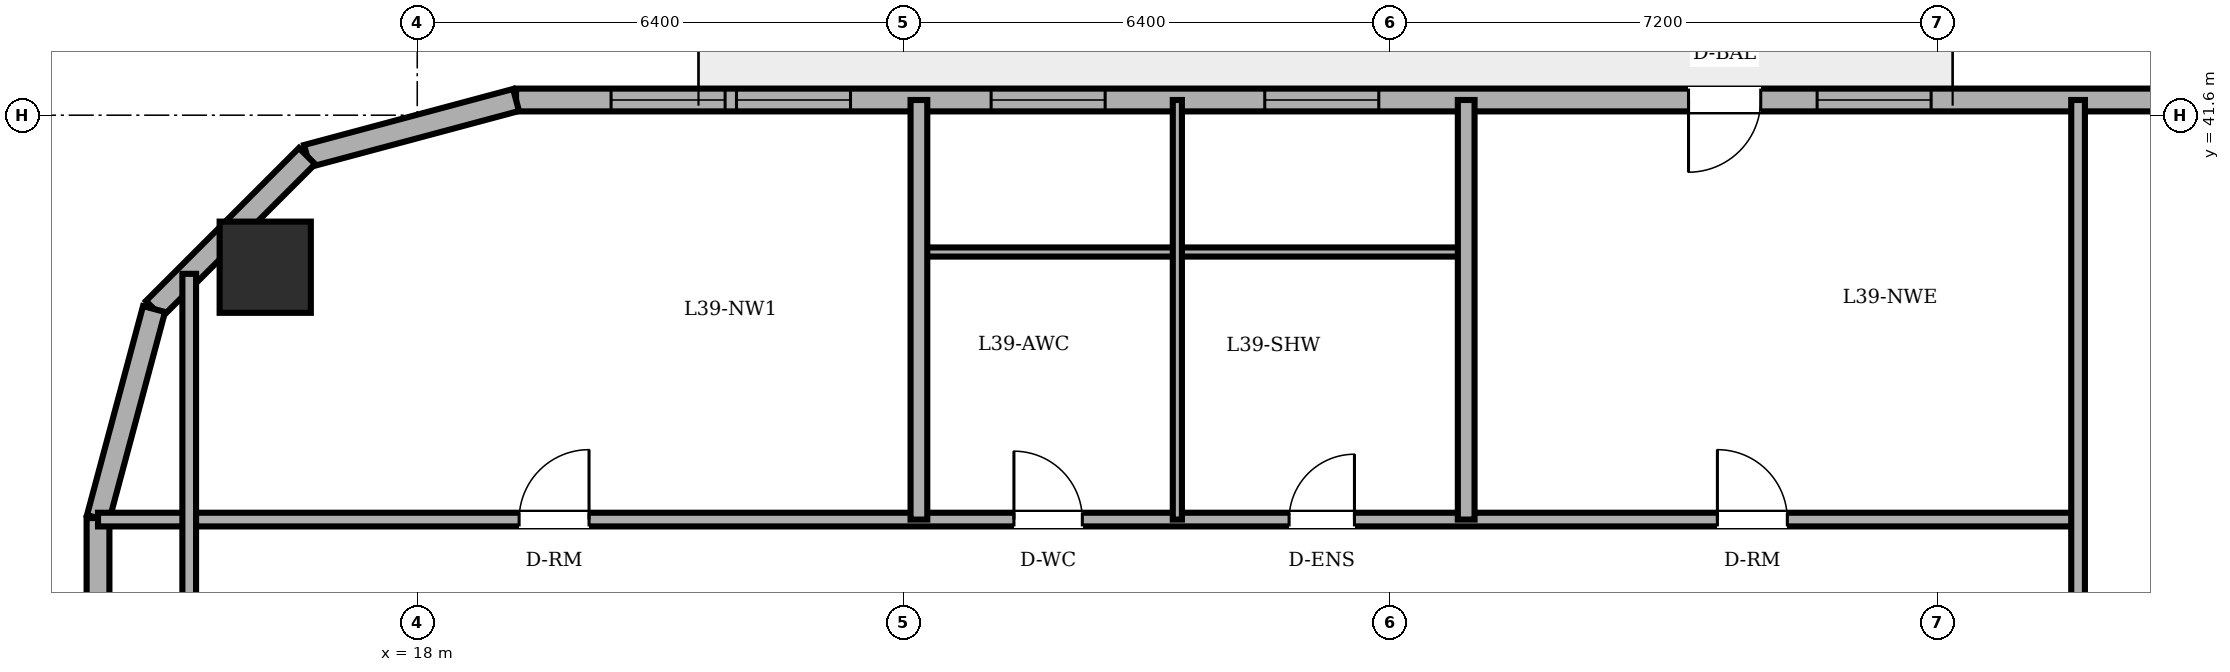
"""IFC4 building model, lengths in metres.
Left out: names, types, materials, properties, quantities, classifications, styles, units other than length and angle.
Written with IfcOpenShell. Run it as: python <this file> out.ifc"""

import sys

from ifc_helpers import new_model, si_unit, direction, frame, frame_2d, origin, origin_2d, place, context, subcontext, project, spatial, rectangle, circle, extrude, element, fill, save


model = new_model("IFC4")
c1 = context("Model", 3, precision=1e-05, world=origin(), true_north=direction((0.0, 1.0)))
c2 = subcontext(c1, "Body", "Model", "MODEL_VIEW")
j1 = project(units=[si_unit("LENGTHUNIT", "METRE"), si_unit("PLANEANGLEUNIT", "RADIAN")], contexts=[c1])
p1 = place(None, origin())
s1 = spatial("IfcSite", under=j1, at=p1, CompositionType="ELEMENT")
p2 = place(p1, origin())
s2 = spatial("IfcBuilding", under=s1, at=p2, CompositionType="ELEMENT")
p3 = place(p2, frame((0.0, 0.0, 151.0)))
s3 = spatial("IfcBuildingStorey", under=s2, at=p3, CompositionType="ELEMENT", Elevation=151.0)
p4 = place(p3, frame((16.0, 39.6, 0.0), z_axis=(0.0, 0.0, 1.0), x_axis=(1.0, 0.0, 0.0)))
e1 = element("IfcColumn", 1, at=p4, inside=s3, PredefinedType="COLUMN", context=c2, shape_type="SweptSolid", body=[
    extrude(circle(Radius=0.6, at=origin_2d()), origin(), (0.0, 0.0, 1.0), 3.6),
])
p5 = place(p3, frame((49.582, 41.8, 0.0), z_axis=(0.0, 0.0, 1.0), x_axis=(-1.0, 0.0, 0.0)))
e2 = element("IfcWall", 2, at=p5, inside=s3, PredefinedType="SOLIDWALL", context=c2, shape_type="SweptSolid", body=[
    extrude(rectangle(XDim=30.282, YDim=0.3, at=frame_2d((15.141, 0.0))), origin(), (0.0, 0.0, 1.0), 3.4),
])
p6 = place(p5, frame((13.907, 0.0, 0.0)))
e3 = element("IfcOpeningElement", 3, at=p6, cuts=e2, PredefinedType="OPENING", context=c2, shape_type="SweptSolid", body=[
    extrude(rectangle(XDim=0.95, YDim=2.2, at=frame_2d((0.475, 1.1))), frame((0.0, 0.16, 0.0), z_axis=(0.0, -1.0, 0.0), x_axis=(1.0, 0.0, 0.0)), (0.0, 0.0, 1.0), 0.32),
])
p7 = place(p5, frame((1.661, 0.0, 0.85)))
e4 = element("IfcOpeningElement", 4, at=p7, cuts=e2, PredefinedType="OPENING", context=c2, shape_type="SweptSolid", body=[
    extrude(rectangle(XDim=1.5, YDim=1.55, at=frame_2d((0.75, 0.775))), frame((0.0, 0.16, 0.0), z_axis=(0.0, -1.0, 0.0), x_axis=(1.0, 0.0, 0.0)), (0.0, 0.0, 1.0), 0.32),
])
p8 = place(p5, frame((5.476, 0.0, 0.85)))
e5 = element("IfcOpeningElement", 5, at=p8, cuts=e2, PredefinedType="OPENING", context=c2, shape_type="SweptSolid", body=[
    extrude(rectangle(XDim=1.5, YDim=1.55, at=frame_2d((0.75, 0.775))), frame((0.0, 0.16, 0.0), z_axis=(0.0, -1.0, 0.0), x_axis=(1.0, 0.0, 0.0)), (0.0, 0.0, 1.0), 0.32),
])
p9 = place(p5, frame((7.229, 0.0, 0.85)))
e6 = element("IfcOpeningElement", 6, at=p9, cuts=e2, PredefinedType="OPENING", context=c2, shape_type="SweptSolid", body=[
    extrude(rectangle(XDim=1.5, YDim=1.55, at=frame_2d((0.75, 0.775))), frame((0.0, 0.16, 0.0), z_axis=(0.0, -1.0, 0.0), x_axis=(1.0, 0.0, 0.0)), (0.0, 0.0, 1.0), 0.32),
])
p10 = place(p5, frame((11.665, 0.0, 0.85)))
e7 = element("IfcOpeningElement", 7, at=p10, cuts=e2, PredefinedType="OPENING", context=c2, shape_type="SweptSolid", body=[
    extrude(rectangle(XDim=1.5, YDim=1.55, at=frame_2d((0.75, 0.775))), frame((0.0, 0.16, 0.0), z_axis=(0.0, -1.0, 0.0), x_axis=(1.0, 0.0, 0.0)), (0.0, 0.0, 1.0), 0.32),
])
p11 = place(p5, frame((18.932, 0.0, 0.85)))
e8 = element("IfcOpeningElement", 8, at=p11, cuts=e2, PredefinedType="OPENING", context=c2, shape_type="SweptSolid", body=[
    extrude(rectangle(XDim=1.5, YDim=1.55, at=frame_2d((0.75, 0.775))), frame((0.0, 0.16, 0.0), z_axis=(0.0, -1.0, 0.0), x_axis=(1.0, 0.0, 0.0)), (0.0, 0.0, 1.0), 0.32),
])
p12 = place(p5, frame((22.532, 0.0, 0.85)))
e9 = element("IfcOpeningElement", 9, at=p12, cuts=e2, PredefinedType="OPENING", context=c2, shape_type="SweptSolid", body=[
    extrude(rectangle(XDim=1.5, YDim=1.55, at=frame_2d((0.75, 0.775))), frame((0.0, 0.16, 0.0), z_axis=(0.0, -1.0, 0.0), x_axis=(1.0, 0.0, 0.0)), (0.0, 0.0, 1.0), 0.32),
])
p13 = place(p5, frame((25.882, 0.0, 0.85)))
e10 = element("IfcOpeningElement", 10, at=p13, cuts=e2, PredefinedType="OPENING", context=c2, shape_type="SweptSolid", body=[
    extrude(rectangle(XDim=1.5, YDim=1.55, at=frame_2d((0.75, 0.775))), frame((0.0, 0.16, 0.0), z_axis=(0.0, -1.0, 0.0), x_axis=(1.0, 0.0, 0.0)), (0.0, 0.0, 1.0), 0.32),
])
p14 = place(p5, frame((27.532, 0.0, 0.85)))
e11 = element("IfcOpeningElement", 11, at=p14, cuts=e2, PredefinedType="OPENING", context=c2, shape_type="SweptSolid", body=[
    extrude(rectangle(XDim=1.5, YDim=1.55, at=frame_2d((0.75, 0.775))), frame((0.0, 0.16, 0.0), z_axis=(0.0, -1.0, 0.0), x_axis=(1.0, 0.0, 0.0)), (0.0, 0.0, 1.0), 0.32),
])
p15 = place(p3, frame((19.3, 41.8, 0.0), z_axis=(0.0, 0.0, 1.0), x_axis=(-0.965908238586, -0.258884674387, 0.0)))
e12 = element("IfcWall", 12, at=p15, inside=s3, PredefinedType="SOLIDWALL", context=c2, shape_type="SweptSolid", body=[
    extrude(rectangle(XDim=2.847, YDim=0.3, at=frame_2d((1.424, 0.0))), origin(), (0.0, 0.0, 1.0), 3.4),
])
p16 = place(p3, frame((16.55, 41.063, 0.0), z_axis=(0.0, 0.0, 1.0), x_axis=(-0.707106781187, -0.707106781187, 0.0)))
e13 = element("IfcWall", 13, at=p16, inside=s3, PredefinedType="SOLIDWALL", context=c2, shape_type="SweptSolid", body=[
    extrude(rectangle(XDim=2.847, YDim=0.3, at=frame_2d((1.423, 0.0))), origin(), (0.0, 0.0, 1.0), 3.4),
])
p17 = place(p3, frame((14.537, 39.05, 0.0), z_axis=(0.0, 0.0, 1.0), x_axis=(-0.258884674387, -0.965908238586, 0.0)))
e14 = element("IfcWall", 14, at=p17, inside=s3, PredefinedType="SOLIDWALL", context=c2, shape_type="SweptSolid", body=[
    extrude(rectangle(XDim=2.847, YDim=0.3, at=frame_2d((1.424, 0.0))), origin(), (0.0, 0.0, 1.0), 3.4),
])
p18 = place(p3, frame((13.8, 36.3, 0.0), z_axis=(0.0, 0.0, 1.0), x_axis=(0.0, -1.0, 0.0)))
e15 = element("IfcWall", 15, at=p18, inside=s3, PredefinedType="SOLIDWALL", context=c2, shape_type="SweptSolid", body=[
    extrude(rectangle(XDim=24.6, YDim=0.3, at=frame_2d((12.3, 0.0))), origin(), (0.0, 0.0, 1.0), 3.4),
])
p19 = place(p18, frame((5.003, 0.0, 0.85)))
e16 = element("IfcOpeningElement", 16, at=p19, cuts=e15, PredefinedType="OPENING", context=c2, shape_type="SweptSolid", body=[
    extrude(rectangle(XDim=1.5, YDim=1.55, at=frame_2d((0.75, 0.775))), frame((0.0, 0.16, 0.0), z_axis=(0.0, -1.0, 0.0), x_axis=(1.0, 0.0, 0.0)), (0.0, 0.0, 1.0), 0.32),
])
p20 = place(p18, frame((8.277, 0.0, 0.85)))
e17 = element("IfcOpeningElement", 17, at=p20, cuts=e15, PredefinedType="OPENING", context=c2, shape_type="SweptSolid", body=[
    extrude(rectangle(XDim=1.5, YDim=1.55, at=frame_2d((0.75, 0.775))), frame((0.0, 0.16, 0.0), z_axis=(0.0, -1.0, 0.0), x_axis=(1.0, 0.0, 0.0)), (0.0, 0.0, 1.0), 0.32),
])
p21 = place(p18, frame((14.823, 0.0, 0.85)))
e18 = element("IfcOpeningElement", 18, at=p21, cuts=e15, PredefinedType="OPENING", context=c2, shape_type="SweptSolid", body=[
    extrude(rectangle(XDim=1.5, YDim=1.55, at=frame_2d((0.75, 0.775))), frame((0.0, 0.16, 0.0), z_axis=(0.0, -1.0, 0.0), x_axis=(1.0, 0.0, 0.0)), (0.0, 0.0, 1.0), 0.32),
])
p22 = place(p18, frame((18.097, 0.0, 0.85)))
e19 = element("IfcOpeningElement", 19, at=p22, cuts=e15, PredefinedType="OPENING", context=c2, shape_type="SweptSolid", body=[
    extrude(rectangle(XDim=1.5, YDim=1.55, at=frame_2d((0.75, 0.775))), frame((0.0, 0.16, 0.0), z_axis=(0.0, -1.0, 0.0), x_axis=(1.0, 0.0, 0.0)), (0.0, 0.0, 1.0), 0.32),
])
p23 = place(p3, frame((13.8, 36.28, 0.0), z_axis=(0.0, 0.0, 1.0), x_axis=(1.0, 0.0, 0.0)))
e20 = element("IfcWall", 20, at=p23, inside=s3, PredefinedType="PARTITIONING", context=c2, shape_type="SweptSolid", body=[
    extrude(rectangle(XDim=26.05, YDim=0.18, at=frame_2d((13.025, 0.0))), origin(), (0.0, 0.0, 1.0), 3.4),
])
p24 = place(p23, frame((12.05, 0.0, 0.0)))
e21 = element("IfcOpeningElement", 21, at=p24, cuts=e20, PredefinedType="OPENING", context=c2, shape_type="SweptSolid", body=[
    extrude(rectangle(XDim=0.9, YDim=2.1, at=frame_2d((0.45, 1.05))), frame((0.0, 0.1, 0.0), z_axis=(0.0, -1.0, 0.0), x_axis=(1.0, 0.0, 0.0)), (0.0, 0.0, 1.0), 0.2),
])
p25 = place(p23, frame((15.67, 0.0, 0.0)))
e22 = element("IfcOpeningElement", 22, at=p25, cuts=e20, PredefinedType="OPENING", context=c2, shape_type="SweptSolid", body=[
    extrude(rectangle(XDim=0.86, YDim=2.1, at=frame_2d((0.43, 1.05))), frame((0.0, 0.1, 0.0), z_axis=(0.0, -1.0, 0.0), x_axis=(1.0, 0.0, 0.0)), (0.0, 0.0, 1.0), 0.2),
])
p26 = place(p23, frame((5.54, 0.0, 0.0)))
e23 = element("IfcOpeningElement", 23, at=p26, cuts=e20, PredefinedType="OPENING", context=c2, shape_type="SweptSolid", body=[
    extrude(rectangle(XDim=0.92, YDim=2.1, at=frame_2d((0.46, 1.05))), frame((0.0, 0.1, 0.0), z_axis=(0.0, -1.0, 0.0), x_axis=(1.0, 0.0, 0.0)), (0.0, 0.0, 1.0), 0.2),
])
p27 = place(p23, frame((21.305, 0.0, 0.0)))
e24 = element("IfcOpeningElement", 24, at=p27, cuts=e20, PredefinedType="OPENING", context=c2, shape_type="SweptSolid", body=[
    extrude(rectangle(XDim=0.92, YDim=2.1, at=frame_2d((0.46, 1.05))), frame((0.0, 0.1, 0.0), z_axis=(0.0, -1.0, 0.0), x_axis=(1.0, 0.0, 0.0)), (0.0, 0.0, 1.0), 0.2),
])
p28 = place(p3, frame((24.6, 39.8, 0.0), z_axis=(0.0, 0.0, 1.0), x_axis=(1.0, 0.0, 0.0)))
e25 = element("IfcWall", 25, at=p28, inside=s3, PredefinedType="PARTITIONING", context=c2, shape_type="SweptSolid", body=[
    extrude(rectangle(XDim=7.2, YDim=0.12, at=frame_2d((3.6, 0.0))), origin(), (0.0, 0.0, 1.0), 2.882),
])
p29 = place(p3, frame((15.0, 33.82, 0.0), z_axis=(0.0, 0.0, 1.0), x_axis=(0.0, 1.0, 0.0)))
e26 = element("IfcWall", 26, at=p29, inside=s3, PredefinedType="PARTITIONING", context=c2, shape_type="SweptSolid", body=[
    extrude(rectangle(XDim=5.693, YDim=0.18, at=frame_2d((2.846, 0.0))), origin(), (0.0, 0.0, 1.0), 3.4),
])
p30 = place(p3, frame((24.6, 36.28, 0.0), z_axis=(0.0, 0.0, 1.0), x_axis=(0.0, 1.0, 0.0)))
e27 = element("IfcWall", 27, at=p30, inside=s3, PredefinedType="PARTITIONING", context=c2, shape_type="SweptSolid", body=[
    extrude(rectangle(XDim=5.52, YDim=0.22, at=frame_2d((2.76, 0.0))), origin(), (0.0, 0.0, 1.0), 3.4),
])
p31 = place(p3, frame((28.0, 36.28, 0.0), z_axis=(0.0, 0.0, 1.0), x_axis=(0.0, 1.0, 0.0)))
e28 = element("IfcWall", 28, at=p31, inside=s3, PredefinedType="PARTITIONING", context=c2, shape_type="SweptSolid", body=[
    extrude(rectangle(XDim=5.52, YDim=0.12, at=frame_2d((2.76, 0.0))), origin(), (0.0, 0.0, 1.0), 3.4),
])
p32 = place(p3, frame((31.8, 36.28, 0.0), z_axis=(0.0, 0.0, 1.0), x_axis=(0.0, 1.0, 0.0)))
e29 = element("IfcWall", 29, at=p32, inside=s3, PredefinedType="PARTITIONING", context=c2, shape_type="SweptSolid", body=[
    extrude(rectangle(XDim=5.52, YDim=0.22, at=frame_2d((2.76, 0.0))), origin(), (0.0, 0.0, 1.0), 3.4),
])
p33 = place(p3, frame((39.85, 25.18, 0.0), z_axis=(0.0, 0.0, 1.0), x_axis=(0.0, 1.0, 0.0)))
e30 = element("IfcWall", 30, at=p33, inside=s3, PredefinedType="PARTITIONING", context=c2, shape_type="SweptSolid", body=[
    extrude(rectangle(XDim=16.62, YDim=0.18, at=frame_2d((8.31, 0.0))), origin(), (0.0, 0.0, 1.0), 3.4),
])
p34 = place(p33, frame((5.31, 0.0, 0.0)))
e31 = element("IfcOpeningElement", 31, at=p34, cuts=e30, PredefinedType="OPENING", context=c2, shape_type="SweptSolid", body=[
    extrude(rectangle(XDim=1.0, YDim=2.15, at=frame_2d((0.5, 1.075))), frame((0.0, 0.1, 0.0), z_axis=(0.0, -1.0, 0.0), x_axis=(1.0, 0.0, 0.0)), (0.0, 0.0, 1.0), 0.2),
])
p35 = place(p6, origin())
e32 = element("IfcDoor", 32, at=p35, inside=s3, OperationType="SINGLE_SWING_RIGHT", PredefinedType="DOOR", context=c2, shape_type="SweptSolid", body=[
    extrude(rectangle(XDim=0.95, YDim=2.2, at=frame_2d((0.475, 1.1))), frame((0.0, 0.025, 0.0), z_axis=(0.0, -1.0, 0.0), x_axis=(1.0, 0.0, 0.0)), (0.0, 0.0, 1.0), 0.05),
])
fill(e3, e32)
p36 = place(p10, origin())
e33 = element("IfcWindow", 33, at=p36, inside=s3, PartitioningType="DOUBLE_PANEL_VERTICAL", PredefinedType="WINDOW", context=c2, shape_type="SweptSolid", body=[
    extrude(rectangle(XDim=1.5, YDim=1.55, at=frame_2d((0.75, 0.775))), frame((0.0, 0.03, 0.0), z_axis=(0.0, -1.0, 0.0), x_axis=(1.0, 0.0, 0.0)), (0.0, 0.0, 1.0), 0.06),
])
fill(e7, e33)
p37 = place(p11, origin())
e34 = element("IfcWindow", 34, at=p37, inside=s3, PartitioningType="DOUBLE_PANEL_VERTICAL", PredefinedType="WINDOW", context=c2, shape_type="SweptSolid", body=[
    extrude(rectangle(XDim=1.5, YDim=1.55, at=frame_2d((0.75, 0.775))), frame((0.0, 0.03, 0.0), z_axis=(0.0, -1.0, 0.0), x_axis=(1.0, 0.0, 0.0)), (0.0, 0.0, 1.0), 0.06),
])
fill(e8, e34)
p38 = place(p12, origin())
e35 = element("IfcWindow", 35, at=p38, inside=s3, PartitioningType="DOUBLE_PANEL_VERTICAL", PredefinedType="WINDOW", context=c2, shape_type="SweptSolid", body=[
    extrude(rectangle(XDim=1.5, YDim=1.55, at=frame_2d((0.75, 0.775))), frame((0.0, 0.03, 0.0), z_axis=(0.0, -1.0, 0.0), x_axis=(1.0, 0.0, 0.0)), (0.0, 0.0, 1.0), 0.06),
])
fill(e9, e35)
p39 = place(p13, origin())
e36 = element("IfcWindow", 36, at=p39, inside=s3, PartitioningType="DOUBLE_PANEL_VERTICAL", PredefinedType="WINDOW", context=c2, shape_type="SweptSolid", body=[
    extrude(rectangle(XDim=1.5, YDim=1.55, at=frame_2d((0.75, 0.775))), frame((0.0, 0.03, 0.0), z_axis=(0.0, -1.0, 0.0), x_axis=(1.0, 0.0, 0.0)), (0.0, 0.0, 1.0), 0.06),
])
fill(e10, e36)
p40 = place(p14, origin())
e37 = element("IfcWindow", 37, at=p40, inside=s3, PartitioningType="DOUBLE_PANEL_VERTICAL", PredefinedType="WINDOW", context=c2, shape_type="SweptSolid", body=[
    extrude(rectangle(XDim=1.5, YDim=1.55, at=frame_2d((0.75, 0.775))), frame((0.0, 0.03, 0.0), z_axis=(0.0, -1.0, 0.0), x_axis=(1.0, 0.0, 0.0)), (0.0, 0.0, 1.0), 0.06),
])
fill(e11, e37)
p41 = place(p24, origin())
e38 = element("IfcDoor", 38, at=p41, inside=s3, OperationType="SINGLE_SWING_LEFT", PredefinedType="DOOR", context=c2, shape_type="SweptSolid", body=[
    extrude(rectangle(XDim=0.9, YDim=2.1, at=frame_2d((0.45, 1.05))), frame((0.0, 0.025, 0.0), z_axis=(0.0, -1.0, 0.0), x_axis=(1.0, 0.0, 0.0)), (0.0, 0.0, 1.0), 0.05),
])
fill(e21, e38)
p42 = place(p25, origin())
e39 = element("IfcDoor", 39, at=p42, inside=s3, OperationType="SINGLE_SWING_RIGHT", PredefinedType="DOOR", context=c2, shape_type="SweptSolid", body=[
    extrude(rectangle(XDim=0.86, YDim=2.1, at=frame_2d((0.43, 1.05))), frame((0.0, 0.025, 0.0), z_axis=(0.0, -1.0, 0.0), x_axis=(1.0, 0.0, 0.0)), (0.0, 0.0, 1.0), 0.05),
])
fill(e22, e39)
p43 = place(p26, origin())
e40 = element("IfcDoor", 40, at=p43, inside=s3, OperationType="SINGLE_SWING_RIGHT", PredefinedType="DOOR", context=c2, shape_type="SweptSolid", body=[
    extrude(rectangle(XDim=0.92, YDim=2.1, at=frame_2d((0.46, 1.05))), frame((0.0, 0.025, 0.0), z_axis=(0.0, -1.0, 0.0), x_axis=(1.0, 0.0, 0.0)), (0.0, 0.0, 1.0), 0.05),
])
fill(e23, e40)
p44 = place(p27, origin())
e41 = element("IfcDoor", 41, at=p44, inside=s3, OperationType="SINGLE_SWING_LEFT", PredefinedType="DOOR", context=c2, shape_type="SweptSolid", body=[
    extrude(rectangle(XDim=0.92, YDim=2.1, at=frame_2d((0.46, 1.05))), frame((0.0, 0.025, 0.0), z_axis=(0.0, -1.0, 0.0), x_axis=(1.0, 0.0, 0.0)), (0.0, 0.0, 1.0), 0.05),
])
fill(e24, e41)
save(model, sys.argv[1])
